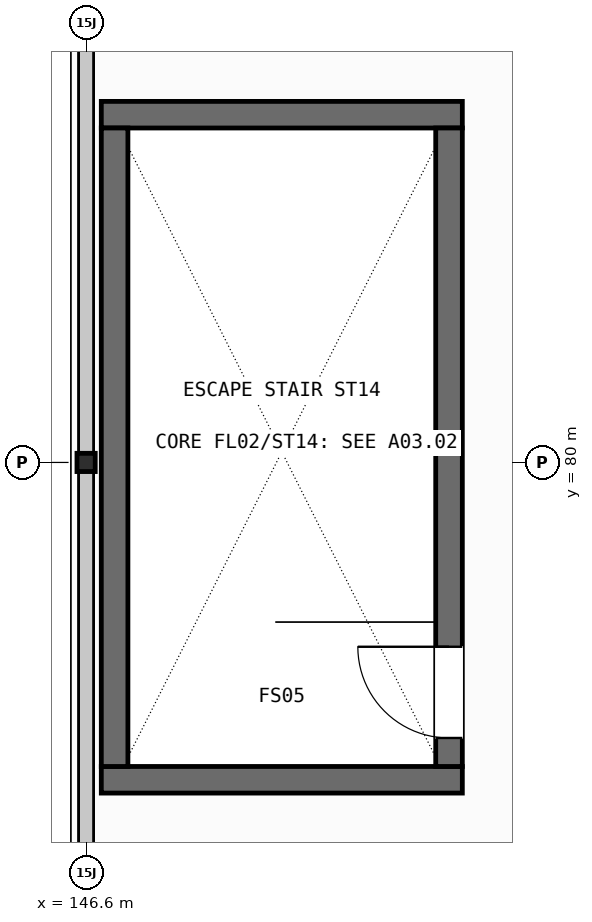
"""IFC4 building model, lengths in metres.
Left out: names, types, materials, properties, quantities, classifications, styles, units other than length and angle.
Written with IfcOpenShell. Run it as: python <this file> out.ifc"""

import sys

from ifc_helpers import new_model, si_unit, direction, frame, frame_2d, origin, origin_2d, place, context, subcontext, project, spatial, rectangle, i_section, extrude, element, fill, save


model = new_model("IFC4")
c1 = context("Model", 3, precision=1e-05, world=origin(), true_north=direction((0.0, 1.0)))
c2 = subcontext(c1, "Body", "Model", "MODEL_VIEW")
j1 = project(units=[si_unit("LENGTHUNIT", "METRE"), si_unit("PLANEANGLEUNIT", "RADIAN")], contexts=[c1])
p1 = place(None, origin())
s1 = spatial("IfcSite", under=j1, at=p1, CompositionType="ELEMENT")
p2 = place(p1, origin())
s2 = spatial("IfcBuilding", under=s1, at=p2, CompositionType="ELEMENT")
p3 = place(p2, frame((0.0, 0.0, 21.6)))
s3 = spatial("IfcBuildingStorey", under=s2, at=p3, CompositionType="ELEMENT", Elevation=21.6)
p4 = place(p3, frame((146.6, 80.0, 0.0), z_axis=(0.0, 0.0, 1.0), x_axis=(1.0, 0.0, 0.0)))
e1 = element("IfcColumn", 1, at=p4, inside=s3, PredefinedType="COLUMN", context=c2, shape_type="SweptSolid", body=[
    extrude(i_section(OverallWidth=0.24, OverallDepth=0.24, WebThickness=0.01, FlangeThickness=0.017, FilletRadius=0.021, at=origin_2d()), origin(), (0.0, 0.0, 1.0), 4.8),
])
for number, where, z_axis, x_axis in (
    (2, (146.8, 75.825, 0.0), (0.0, 0.0, 1.0), (1.0, 0.0, 0.0)),
    (3, (146.8, 84.575, 0.0), (0.0, 0.0, 1.0), (1.0, 0.0, 0.0)),
):
    element("IfcWall", number, at=place(p3, frame(where, z_axis=z_axis, x_axis=x_axis)), inside=s3, PredefinedType="SHEAR", context=c2, shape_type="SweptSolid", body=[
        extrude(rectangle(XDim=4.75, YDim=0.35, at=frame_2d((2.375, 0.0))), origin(), (0.0, 0.0, 1.0), 4.2),
    ])
p5 = place(p3, frame((146.975, 76.0, 0.0), z_axis=(0.0, 0.0, 1.0), x_axis=(0.0, 1.0, 0.0)))
e4 = element("IfcWall", 4, at=p5, inside=s3, PredefinedType="SHEAR", context=c2, shape_type="SweptSolid", body=[
    extrude(rectangle(XDim=8.4, YDim=0.35, at=frame_2d((4.2, 0.0))), origin(), (0.0, 0.0, 1.0), 4.2),
])
p6 = place(p3, frame((151.375, 76.0, 0.0), z_axis=(0.0, 0.0, 1.0), x_axis=(0.0, 1.0, 0.0)))
e5 = element("IfcWall", 5, at=p6, inside=s3, PredefinedType="SHEAR", context=c2, shape_type="SweptSolid", body=[
    extrude(rectangle(XDim=8.4, YDim=0.35, at=frame_2d((4.2, 0.0))), origin(), (0.0, 0.0, 1.0), 4.2),
])
p7 = place(p6, frame((0.375, 0.0, 0.0)))
e6 = element("IfcOpeningElement", 6, at=p7, cuts=e5, PredefinedType="OPENING", context=c2, shape_type="SweptSolid", body=[
    extrude(rectangle(XDim=1.2, YDim=2.2, at=frame_2d((0.6, 1.1))), frame((0.0, 0.185, 0.0), z_axis=(0.0, -1.0, 0.0), x_axis=(1.0, 0.0, 0.0)), (0.0, 0.0, 1.0), 0.37),
])
for number, where, z_axis, x_axis in (
    (7, (146.6, 74.116, 0.0), (0.0, 0.0, 1.0), (0.0, 1.0, 0.0)),
    (8, (146.6, 80.116, 0.0), (0.0, 0.0, 1.0), (0.0, 1.0, 0.0)),
):
    element("IfcWall", number, at=place(p3, frame(where, z_axis=z_axis, x_axis=x_axis)), inside=s3, PredefinedType="STANDARD", context=c2, shape_type="SweptSolid", body=[
        extrude(rectangle(XDim=5.768, YDim=0.202, at=frame_2d((2.884, 0.0))), origin(), (0.0, 0.0, 1.0), 4.0),
    ])
p8 = place(p3, frame((146.6, 54.98, 4.8), z_axis=(0.0, 0.0, 1.0), x_axis=(0.0, 1.0, 0.0)))
e9 = element("IfcWall", 9, at=p8, inside=s3, PredefinedType="PARAPET", context=c2, shape_type="SweptSolid", body=[
    extrude(rectangle(XDim=42.94, YDim=0.192, at=frame_2d((21.47, 0.0))), origin(), (0.0, 0.0, 1.0), 0.95),
])
p9 = place(p7, origin())
e10 = element("IfcDoor", 10, at=p9, inside=s3, OperationType="SINGLE_SWING_RIGHT", PredefinedType="DOOR", context=c2, shape_type="SweptSolid", body=[
    extrude(rectangle(XDim=1.2, YDim=2.2, at=frame_2d((0.6, 1.1))), frame((0.0, 0.025, 0.0), z_axis=(0.0, -1.0, 0.0), x_axis=(1.0, 0.0, 0.0)), (0.0, 0.0, 1.0), 0.05),
])
fill(e6, e10)
save(model, sys.argv[1])
